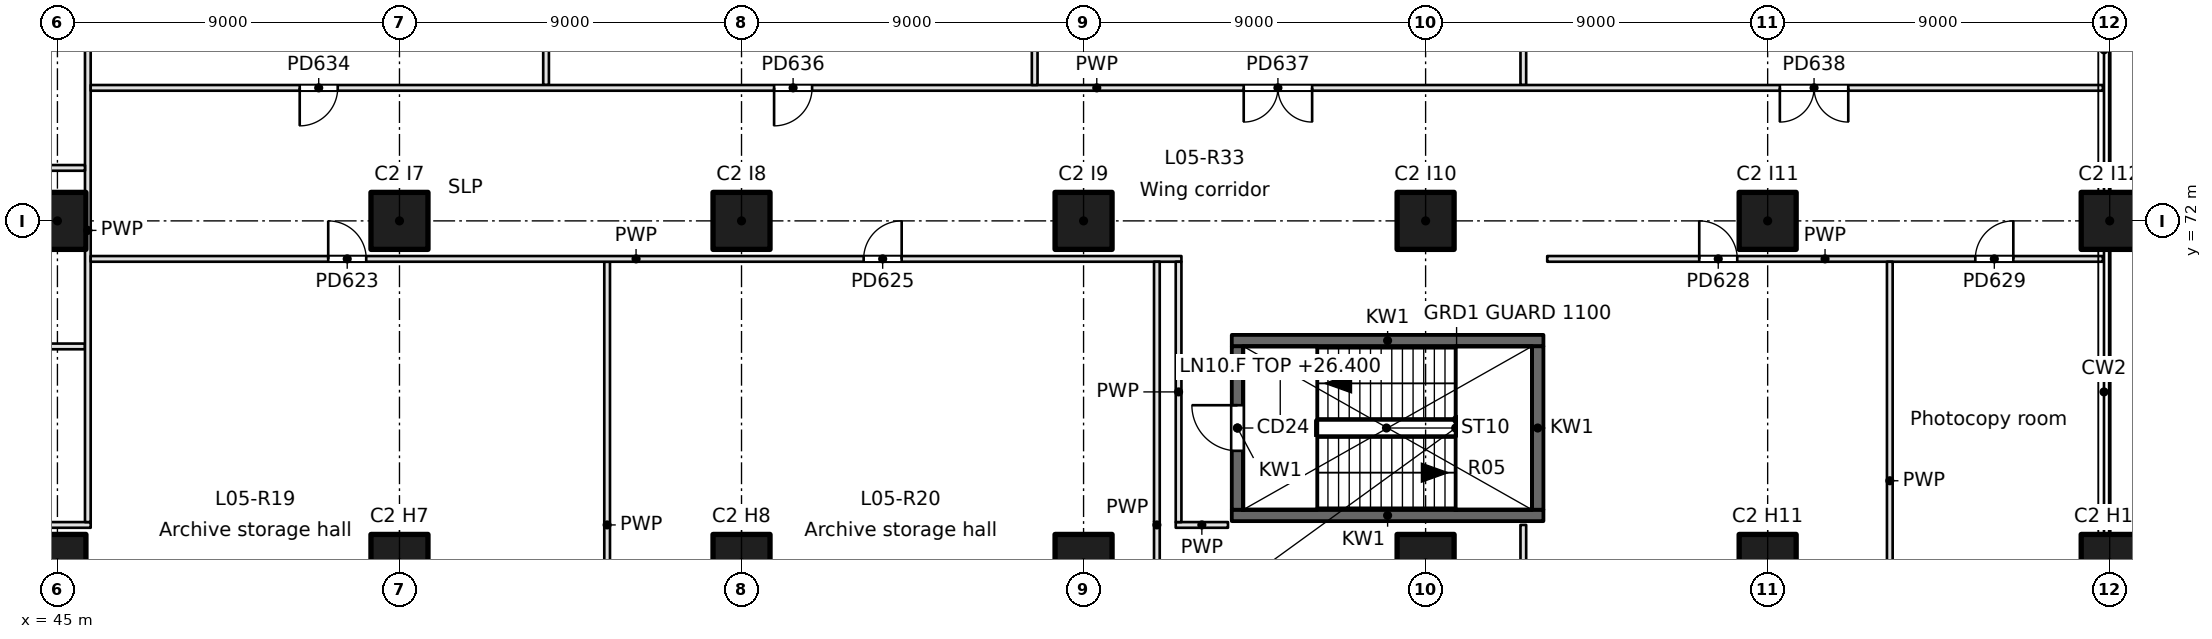
"""IFC4 building model, lengths in metres.
Left out: names, types, materials, properties, quantities, classifications, styles, units other than length and angle.
Written with IfcOpenShell. Run it as: python <this file> out.ifc"""

import sys

from ifc_helpers import new_model, si_unit, direction, frame, frame_2d, origin, origin_2d, place, context, subcontext, project, spatial, rectangle, extrude, element, fill, save


model = new_model("IFC4")
c1 = context("Model", 3, precision=1e-05, world=origin(), true_north=direction((0.0, 1.0)))
c2 = subcontext(c1, "Body", "Model", "MODEL_VIEW")
j1 = project(units=[si_unit("LENGTHUNIT", "METRE"), si_unit("PLANEANGLEUNIT", "RADIAN")], contexts=[c1])
p1 = place(None, origin())
s1 = spatial("IfcSite", under=j1, at=p1, CompositionType="ELEMENT")
p2 = place(p1, origin())
s2 = spatial("IfcBuilding", under=s1, at=p2, CompositionType="ELEMENT")
p3 = place(p2, frame((0.0, 0.0, 26.4)))
s3 = spatial("IfcBuildingStorey", under=s2, at=p3, CompositionType="ELEMENT", Elevation=26.4)
for number, where, z_axis, x_axis in (
    (1, (99.0, 63.0, 0.0), (0.0, 0.0, 1.0), (1.0, 0.0, 0.0)),
    (2, (99.0, 72.0, 0.0), (0.0, 0.0, 1.0), (1.0, 0.0, 0.0)),
    (3, (45.0, 63.0, 0.0), (0.0, 0.0, 1.0), (1.0, 0.0, 0.0)),
    (4, (45.0, 72.0, 0.0), (0.0, 0.0, 1.0), (1.0, 0.0, 0.0)),
    (5, (54.0, 63.0, 0.0), (0.0, 0.0, 1.0), (1.0, 0.0, 0.0)),
    (6, (54.0, 72.0, 0.0), (0.0, 0.0, 1.0), (1.0, 0.0, 0.0)),
    (7, (63.0, 63.0, 0.0), (0.0, 0.0, 1.0), (1.0, 0.0, 0.0)),
    (8, (63.0, 72.0, 0.0), (0.0, 0.0, 1.0), (1.0, 0.0, 0.0)),
    (9, (72.0, 63.0, 0.0), (0.0, 0.0, 1.0), (1.0, 0.0, 0.0)),
    (10, (72.0, 72.0, 0.0), (0.0, 0.0, 1.0), (1.0, 0.0, 0.0)),
    (11, (81.0, 63.0, 0.0), (0.0, 0.0, 1.0), (1.0, 0.0, 0.0)),
    (12, (81.0, 72.0, 0.0), (0.0, 0.0, 1.0), (1.0, 0.0, 0.0)),
    (13, (90.0, 63.0, 0.0), (0.0, 0.0, 1.0), (1.0, 0.0, 0.0)),
    (14, (90.0, 72.0, 0.0), (0.0, 0.0, 1.0), (1.0, 0.0, 0.0)),
):
    element("IfcColumn", number, at=place(p3, frame(where, z_axis=z_axis, x_axis=x_axis)), inside=s3, PredefinedType="COLUMN", context=c2, shape_type="SweptSolid", body=[
        extrude(rectangle(XDim=1.5, YDim=1.5, at=origin_2d()), origin(), (0.0, 0.0, 1.0), 4.8),
    ])
for number, where, z_axis, x_axis in (
    (15, (75.9, 64.25, -0.35), (0.0, 0.0, 1.0), (1.0, 0.0, 0.0)),
    (16, (75.9, 68.85, -0.35), (0.0, 0.0, 1.0), (1.0, 0.0, 0.0)),
):
    element("IfcWall", number, at=place(p3, frame(where, z_axis=z_axis, x_axis=x_axis)), inside=s3, PredefinedType="SOLIDWALL", context=c2, shape_type="SweptSolid", body=[
        extrude(rectangle(XDim=8.2, YDim=0.3, at=frame_2d((4.1, 0.0))), origin(), (0.0, 0.0, 1.0), 4.7),
    ])
p4 = place(p3, frame((76.05, 64.4, -0.35), z_axis=(0.0, 0.0, 1.0), x_axis=(0.0, 1.0, 0.0)))
e17 = element("IfcWall", 17, at=p4, inside=s3, PredefinedType="SOLIDWALL", context=c2, shape_type="SweptSolid", body=[
    extrude(rectangle(XDim=4.3, YDim=0.3, at=frame_2d((2.15, 0.0))), origin(), (0.0, 0.0, 1.0), 4.7),
])
p5 = place(p4, frame((1.55, 0.0, 0.35)))
e18 = element("IfcOpeningElement", 18, at=p5, cuts=e17, PredefinedType="OPENING", context=c2, shape_type="SweptSolid", body=[
    extrude(rectangle(XDim=1.2, YDim=2.1, at=frame_2d((0.6, 1.05))), frame((0.0, 0.15, 0.0), z_axis=(0.0, -1.0, 0.0), x_axis=(1.0, 0.0, 0.0)), (0.0, 0.0, 1.0), 0.3),
])
p6 = place(p3, frame((83.95, 64.4, -0.35), z_axis=(0.0, 0.0, 1.0), x_axis=(0.0, 1.0, 0.0)))
e19 = element("IfcWall", 19, at=p6, inside=s3, PredefinedType="SOLIDWALL", context=c2, shape_type="SweptSolid", body=[
    extrude(rectangle(XDim=4.3, YDim=0.3, at=frame_2d((2.15, 0.0))), origin(), (0.0, 0.0, 1.0), 4.7),
])
p7 = place(p3, frame((40.575, 68.697, 0.0), z_axis=(0.0, 0.0, 1.0), x_axis=(1.0, 0.0, 0.0)))
e20 = element("IfcWall", 20, at=p7, inside=s3, PredefinedType="PARTITIONING", context=c2, shape_type="SweptSolid", body=[
    extrude(rectangle(XDim=5.15, YDim=0.15, at=frame_2d((2.575, 0.0))), origin(), (0.0, 0.0, 1.0), 4.35),
])
p8 = place(p3, frame((45.875, 64.0, 0.0), z_axis=(0.0, 0.0, 1.0), x_axis=(-1.0, 0.0, 0.0)))
e21 = element("IfcWall", 21, at=p8, inside=s3, PredefinedType="PARTITIONING", context=c2, shape_type="SweptSolid", body=[
    extrude(rectangle(XDim=5.45, YDim=0.15, at=frame_2d((2.725, 0.0))), origin(), (0.0, 0.0, 1.0), 4.35),
])
p9 = place(p3, frame((74.425, 64.0, 0.0), z_axis=(0.0, 0.0, 1.0), x_axis=(1.0, 0.0, 0.0)))
e22 = element("IfcWall", 22, at=p9, inside=s3, PredefinedType="PARTITIONING", context=c2, shape_type="SweptSolid", body=[
    extrude(rectangle(XDim=1.375, YDim=0.15, at=frame_2d((0.688, 0.0))), origin(), (0.0, 0.0, 1.0), 4.35),
])
p10 = place(p3, frame((45.8, 79.425, 0.0), z_axis=(0.0, 0.0, 1.0), x_axis=(0.0, -1.0, 0.0)))
e23 = element("IfcWall", 23, at=p10, inside=s3, PredefinedType="PARTITIONING", context=c2, shape_type="SweptSolid", body=[
    extrude(rectangle(XDim=15.35, YDim=0.15, at=frame_2d((7.675, 0.0))), origin(), (0.0, 0.0, 1.0), 4.35),
])
p11 = place(p3, frame((40.575, 73.394, 0.0), z_axis=(0.0, 0.0, 1.0), x_axis=(1.0, 0.0, 0.0)))
e24 = element("IfcWall", 24, at=p11, inside=s3, PredefinedType="PARTITIONING", context=c2, shape_type="SweptSolid", body=[
    extrude(rectangle(XDim=5.15, YDim=0.15, at=frame_2d((2.575, 0.0))), origin(), (0.0, 0.0, 1.0), 4.35),
])
p12 = place(p3, frame((59.464, 57.075, 0.0), z_axis=(0.0, 0.0, 1.0), x_axis=(0.0, 1.0, 0.0)))
e25 = element("IfcWall", 25, at=p12, inside=s3, PredefinedType="PARTITIONING", context=c2, shape_type="SweptSolid", body=[
    extrude(rectangle(XDim=13.85, YDim=0.15, at=frame_2d((6.925, 0.0))), origin(), (0.0, 0.0, 1.0), 4.35),
])
p13 = place(p3, frame((45.875, 71.0, 0.0), z_axis=(0.0, 0.0, 1.0), x_axis=(1.0, 0.0, 0.0)))
e26 = element("IfcWall", 26, at=p13, inside=s3, PredefinedType="PARTITIONING", context=c2, shape_type="SweptSolid", body=[
    extrude(rectangle(XDim=28.7, YDim=0.15, at=frame_2d((14.35, 0.0))), origin(), (0.0, 0.0, 1.0), 4.35),
])
p14 = place(p13, frame((6.25, 0.0, 0.0)))
e27 = element("IfcOpeningElement", 27, at=p14, cuts=e26, PredefinedType="OPENING", context=c2, shape_type="SweptSolid", body=[
    extrude(rectangle(XDim=1.0, YDim=2.1, at=frame_2d((0.5, 1.05))), frame((0.0, 0.075, 0.0), z_axis=(0.0, -1.0, 0.0), x_axis=(1.0, 0.0, 0.0)), (0.0, 0.0, 1.0), 0.15),
])
p15 = place(p13, frame((20.339, 0.0, 0.0)))
e28 = element("IfcOpeningElement", 28, at=p15, cuts=e26, PredefinedType="OPENING", context=c2, shape_type="SweptSolid", body=[
    extrude(rectangle(XDim=1.0, YDim=2.1, at=frame_2d((0.5, 1.05))), frame((0.0, 0.075, 0.0), z_axis=(0.0, -1.0, 0.0), x_axis=(1.0, 0.0, 0.0)), (0.0, 0.0, 1.0), 0.15),
])
p16 = place(p3, frame((84.2, 71.0, 0.0), z_axis=(0.0, 0.0, 1.0), x_axis=(1.0, 0.0, 0.0)))
e29 = element("IfcWall", 29, at=p16, inside=s3, PredefinedType="PARTITIONING", context=c2, shape_type="SweptSolid", body=[
    extrude(rectangle(XDim=14.62, YDim=0.15, at=frame_2d((7.31, 0.0))), origin(), (0.0, 0.0, 1.0), 4.35),
])
p17 = place(p16, frame((4.0, 0.0, 0.0)))
e30 = element("IfcOpeningElement", 30, at=p17, cuts=e29, PredefinedType="OPENING", context=c2, shape_type="SweptSolid", body=[
    extrude(rectangle(XDim=1.0, YDim=2.1, at=frame_2d((0.5, 1.05))), frame((0.0, 0.075, 0.0), z_axis=(0.0, -1.0, 0.0), x_axis=(1.0, 0.0, 0.0)), (0.0, 0.0, 1.0), 0.15),
])
p18 = place(p16, frame((11.264, 0.0, 0.0)))
e31 = element("IfcOpeningElement", 31, at=p18, cuts=e29, PredefinedType="OPENING", context=c2, shape_type="SweptSolid", body=[
    extrude(rectangle(XDim=1.0, YDim=2.1, at=frame_2d((0.5, 1.05))), frame((0.0, 0.075, 0.0), z_axis=(0.0, -1.0, 0.0), x_axis=(1.0, 0.0, 0.0)), (0.0, 0.0, 1.0), 0.15),
])
p19 = place(p3, frame((73.929, 57.075, 0.0), z_axis=(0.0, 0.0, 1.0), x_axis=(0.0, 1.0, 0.0)))
e32 = element("IfcWall", 32, at=p19, inside=s3, PredefinedType="PARTITIONING", context=c2, shape_type="SweptSolid", body=[
    extrude(rectangle(XDim=13.85, YDim=0.15, at=frame_2d((6.925, 0.0))), origin(), (0.0, 0.0, 1.0), 4.35),
])
p20 = place(p3, frame((83.571, 57.075, 0.0), z_axis=(0.0, 0.0, 1.0), x_axis=(0.0, 1.0, 0.0)))
e33 = element("IfcWall", 33, at=p20, inside=s3, PredefinedType="PARTITIONING", context=c2, shape_type="SweptSolid", body=[
    extrude(rectangle(XDim=6.925, YDim=0.15, at=frame_2d((3.462, 0.0))), origin(), (0.0, 0.0, 1.0), 4.35),
])
p21 = place(p3, frame((83.571, 75.575, 0.0), z_axis=(0.0, 0.0, 1.0), x_axis=(0.0, 1.0, 0.0)))
e34 = element("IfcWall", 34, at=p21, inside=s3, PredefinedType="PARTITIONING", context=c2, shape_type="SweptSolid", body=[
    extrude(rectangle(XDim=22.525, YDim=0.15, at=frame_2d((11.263, 0.0))), origin(), (0.0, 0.0, 1.0), 4.35),
])
p22 = place(p3, frame((74.5, 70.925, 0.0), z_axis=(0.0, 0.0, 1.0), x_axis=(0.0, -1.0, 0.0)))
e35 = element("IfcWall", 35, at=p22, inside=s3, PredefinedType="PARTITIONING", context=c2, shape_type="SweptSolid", body=[
    extrude(rectangle(XDim=6.85, YDim=0.15, at=frame_2d((3.425, 0.0))), origin(), (0.0, 0.0, 1.0), 4.35),
])
p23 = place(p3, frame((93.214, 59.4, 0.0), z_axis=(0.0, 0.0, 1.0), x_axis=(0.0, 1.0, 0.0)))
e36 = element("IfcWall", 36, at=p23, inside=s3, PredefinedType="PARTITIONING", context=c2, shape_type="SweptSolid", body=[
    extrude(rectangle(XDim=11.525, YDim=0.15, at=frame_2d((5.763, 0.0))), origin(), (0.0, 0.0, 1.0), 4.35),
])
p24 = place(p3, frame((57.857, 75.575, 0.0), z_axis=(0.0, 0.0, 1.0), x_axis=(0.0, 1.0, 0.0)))
e37 = element("IfcWall", 37, at=p24, inside=s3, PredefinedType="PARTITIONING", context=c2, shape_type="SweptSolid", body=[
    extrude(rectangle(XDim=22.525, YDim=0.15, at=frame_2d((11.263, 0.0))), origin(), (0.0, 0.0, 1.0), 4.35),
])
p25 = place(p3, frame((98.82, 75.5, 0.0), z_axis=(0.0, 0.0, 1.0), x_axis=(-1.0, 0.0, 0.0)))
e38 = element("IfcWall", 38, at=p25, inside=s3, PredefinedType="PARTITIONING", context=c2, shape_type="SweptSolid", body=[
    extrude(rectangle(XDim=52.945, YDim=0.15, at=frame_2d((26.473, 0.0))), origin(), (0.0, 0.0, 1.0), 4.35),
])
p26 = place(p25, frame((46.445, 0.0, 0.0)))
e39 = element("IfcOpeningElement", 39, at=p26, cuts=e38, PredefinedType="OPENING", context=c2, shape_type="SweptSolid", body=[
    extrude(rectangle(XDim=1.0, YDim=2.1, at=frame_2d((0.5, 1.05))), frame((0.0, 0.075, 0.0), z_axis=(0.0, -1.0, 0.0), x_axis=(1.0, 0.0, 0.0)), (0.0, 0.0, 1.0), 0.15),
])
p27 = place(p25, frame((33.963, 0.0, 0.0)))
e40 = element("IfcOpeningElement", 40, at=p27, cuts=e38, PredefinedType="OPENING", context=c2, shape_type="SweptSolid", body=[
    extrude(rectangle(XDim=1.0, YDim=2.1, at=frame_2d((0.5, 1.05))), frame((0.0, 0.075, 0.0), z_axis=(0.0, -1.0, 0.0), x_axis=(1.0, 0.0, 0.0)), (0.0, 0.0, 1.0), 0.15),
])
p28 = place(p25, frame((20.806, 0.0, 0.0)))
e41 = element("IfcOpeningElement", 41, at=p28, cuts=e38, PredefinedType="OPENING", context=c2, shape_type="SweptSolid", body=[
    extrude(rectangle(XDim=1.8, YDim=2.1, at=frame_2d((0.9, 1.05))), frame((0.0, 0.075, 0.0), z_axis=(0.0, -1.0, 0.0), x_axis=(1.0, 0.0, 0.0)), (0.0, 0.0, 1.0), 0.15),
])
p29 = place(p25, frame((6.699, 0.0, 0.0)))
e42 = element("IfcOpeningElement", 42, at=p29, cuts=e38, PredefinedType="OPENING", context=c2, shape_type="SweptSolid", body=[
    extrude(rectangle(XDim=1.8, YDim=2.1, at=frame_2d((0.9, 1.05))), frame((0.0, 0.075, 0.0), z_axis=(0.0, -1.0, 0.0), x_axis=(1.0, 0.0, 0.0)), (0.0, 0.0, 1.0), 0.15),
])
p30 = place(p3, frame((70.714, 75.575, 0.0), z_axis=(0.0, 0.0, 1.0), x_axis=(0.0, 1.0, 0.0)))
e43 = element("IfcWall", 43, at=p30, inside=s3, PredefinedType="PARTITIONING", context=c2, shape_type="SweptSolid", body=[
    extrude(rectangle(XDim=17.925, YDim=0.15, at=frame_2d((8.962, 0.0))), origin(), (0.0, 0.0, 1.0), 4.35),
])
p31 = place(p5, origin())
e44 = element("IfcDoor", 44, at=p31, inside=s3, OperationType="SINGLE_SWING_RIGHT", PredefinedType="DOOR", context=c2, shape_type="SweptSolid", body=[
    extrude(rectangle(XDim=1.2, YDim=2.1, at=frame_2d((0.6, 1.05))), frame((0.0, 0.025, 0.0), z_axis=(0.0, -1.0, 0.0), x_axis=(1.0, 0.0, 0.0)), (0.0, 0.0, 1.0), 0.05),
])
fill(e18, e44)
p32 = place(p14, origin())
e45 = element("IfcDoor", 45, at=p32, inside=s3, OperationType="SINGLE_SWING_LEFT", PredefinedType="DOOR", context=c2, shape_type="SweptSolid", body=[
    extrude(rectangle(XDim=1.0, YDim=2.1, at=frame_2d((0.5, 1.05))), frame((0.0, 0.025, 0.0), z_axis=(0.0, -1.0, 0.0), x_axis=(1.0, 0.0, 0.0)), (0.0, 0.0, 1.0), 0.05),
])
fill(e27, e45)
p33 = place(p15, origin())
e46 = element("IfcDoor", 46, at=p33, inside=s3, OperationType="SINGLE_SWING_RIGHT", PredefinedType="DOOR", context=c2, shape_type="SweptSolid", body=[
    extrude(rectangle(XDim=1.0, YDim=2.1, at=frame_2d((0.5, 1.05))), frame((0.0, 0.025, 0.0), z_axis=(0.0, -1.0, 0.0), x_axis=(1.0, 0.0, 0.0)), (0.0, 0.0, 1.0), 0.05),
])
fill(e28, e46)
p34 = place(p17, origin())
e47 = element("IfcDoor", 47, at=p34, inside=s3, OperationType="SINGLE_SWING_LEFT", PredefinedType="DOOR", context=c2, shape_type="SweptSolid", body=[
    extrude(rectangle(XDim=1.0, YDim=2.1, at=frame_2d((0.5, 1.05))), frame((0.0, 0.025, 0.0), z_axis=(0.0, -1.0, 0.0), x_axis=(1.0, 0.0, 0.0)), (0.0, 0.0, 1.0), 0.05),
])
fill(e30, e47)
p35 = place(p18, origin())
e48 = element("IfcDoor", 48, at=p35, inside=s3, OperationType="SINGLE_SWING_RIGHT", PredefinedType="DOOR", context=c2, shape_type="SweptSolid", body=[
    extrude(rectangle(XDim=1.0, YDim=2.1, at=frame_2d((0.5, 1.05))), frame((0.0, 0.025, 0.0), z_axis=(0.0, -1.0, 0.0), x_axis=(1.0, 0.0, 0.0)), (0.0, 0.0, 1.0), 0.05),
])
fill(e31, e48)
p36 = place(p26, origin())
e49 = element("IfcDoor", 49, at=p36, inside=s3, OperationType="SINGLE_SWING_RIGHT", PredefinedType="DOOR", context=c2, shape_type="SweptSolid", body=[
    extrude(rectangle(XDim=1.0, YDim=2.1, at=frame_2d((0.5, 1.05))), frame((0.0, 0.025, 0.0), z_axis=(0.0, -1.0, 0.0), x_axis=(1.0, 0.0, 0.0)), (0.0, 0.0, 1.0), 0.05),
])
fill(e39, e49)
p37 = place(p27, origin())
e50 = element("IfcDoor", 50, at=p37, inside=s3, OperationType="SINGLE_SWING_RIGHT", PredefinedType="DOOR", context=c2, shape_type="SweptSolid", body=[
    extrude(rectangle(XDim=1.0, YDim=2.1, at=frame_2d((0.5, 1.05))), frame((0.0, 0.025, 0.0), z_axis=(0.0, -1.0, 0.0), x_axis=(1.0, 0.0, 0.0)), (0.0, 0.0, 1.0), 0.05),
])
fill(e40, e50)
p38 = place(p28, origin())
e51 = element("IfcDoor", 51, at=p38, inside=s3, OperationType="DOUBLE_DOOR_SINGLE_SWING", PredefinedType="DOOR", context=c2, shape_type="SweptSolid", body=[
    extrude(rectangle(XDim=1.8, YDim=2.1, at=frame_2d((0.9, 1.05))), frame((0.0, 0.025, 0.0), z_axis=(0.0, -1.0, 0.0), x_axis=(1.0, 0.0, 0.0)), (0.0, 0.0, 1.0), 0.05),
])
fill(e41, e51)
p39 = place(p29, origin())
e52 = element("IfcDoor", 52, at=p39, inside=s3, OperationType="DOUBLE_DOOR_SINGLE_SWING", PredefinedType="DOOR", context=c2, shape_type="SweptSolid", body=[
    extrude(rectangle(XDim=1.8, YDim=2.1, at=frame_2d((0.9, 1.05))), frame((0.0, 0.025, 0.0), z_axis=(0.0, -1.0, 0.0), x_axis=(1.0, 0.0, 0.0)), (0.0, 0.0, 1.0), 0.05),
])
fill(e42, e52)
save(model, sys.argv[1])
